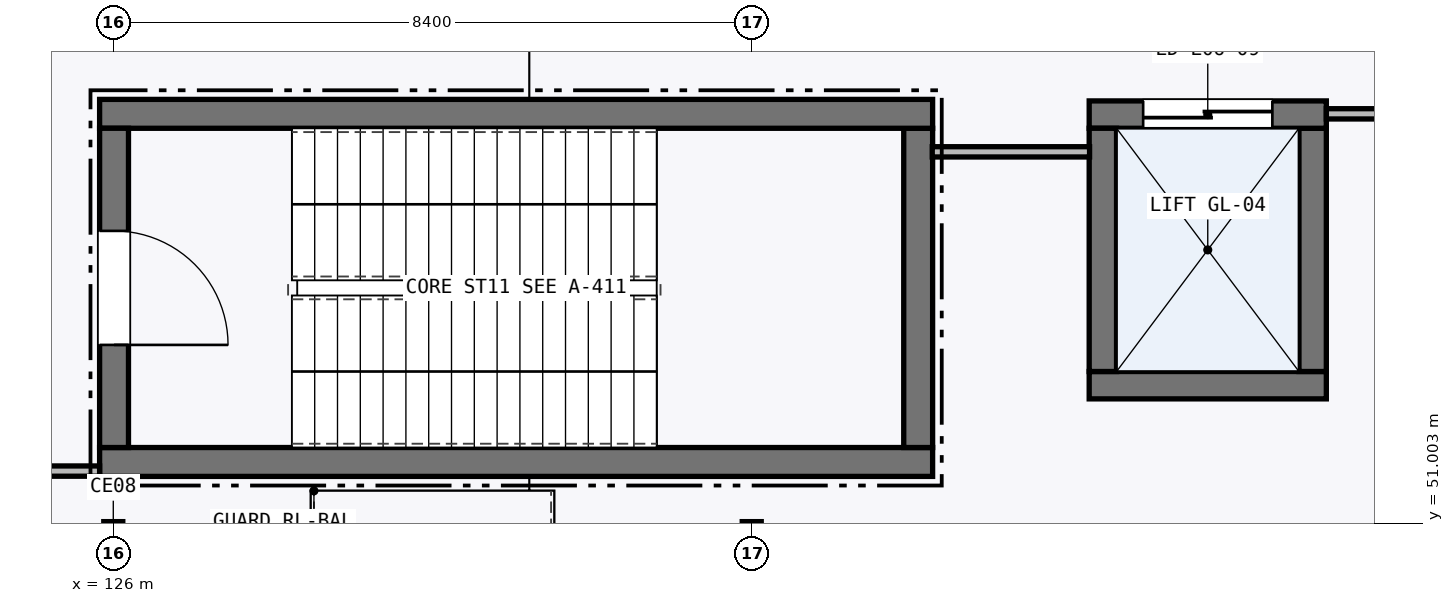
"""IFC4 building model, lengths in metres.
Left out: names, types, materials, properties, quantities, classifications, styles, units other than length and angle.
Written with IfcOpenShell. Run it as: python <this file> out.ifc"""

import sys

from ifc_helpers import new_model, si_unit, direction, frame, frame_2d, origin, origin_2d, place, context, subcontext, project, spatial, rectangle, i_section, extrude, element, fill, save


model = new_model("IFC4")
c1 = context("Model", 3, precision=1e-05, world=origin(), true_north=direction((0.0, 1.0)))
c2 = subcontext(c1, "Body", "Model", "MODEL_VIEW")
j1 = project(units=[si_unit("LENGTHUNIT", "METRE"), si_unit("PLANEANGLEUNIT", "RADIAN")], contexts=[c1])
p1 = place(None, origin())
s1 = spatial("IfcSite", under=j1, at=p1, CompositionType="ELEMENT")
p2 = place(p1, origin())
s2 = spatial("IfcBuilding", under=s1, at=p2, CompositionType="ELEMENT")
p3 = place(p2, frame((0.0, 0.0, 26.7)))
s3 = spatial("IfcBuildingStorey", under=s2, at=p3, CompositionType="ELEMENT", Elevation=26.7)
for number, where, z_axis, x_axis in (
    (1, (126.0, 50.9, 0.0), (0.0, 0.0, 1.0), (1.0, 0.0, 0.0)),
    (2, (134.4, 50.9, 0.0), (0.0, 0.0, 1.0), (1.0, 0.0, 0.0)),
):
    element("IfcColumn", number, at=place(p3, frame(where, z_axis=z_axis, x_axis=x_axis)), inside=s3, PredefinedType="COLUMN", context=c2, shape_type="SweptSolid", body=[
        extrude(i_section(OverallWidth=0.25, OverallDepth=0.25, WebThickness=0.009, FlangeThickness=0.014, FilletRadius=0.016, at=origin_2d()), origin(), (0.0, 0.0, 1.0), 5.1),
    ])
p4 = place(p3, frame((125.82, 51.81, 0.0), z_axis=(0.0, 0.0, 1.0), x_axis=(1.0, 0.0, 0.0)))
e3 = element("IfcWall", 3, at=p4, inside=s3, PredefinedType="SHEAR", context=c2, shape_type="SweptSolid", body=[
    extrude(rectangle(XDim=10.96, YDim=0.38, at=frame_2d((5.48, 0.0))), origin(), (0.0, 0.0, 1.0), 4.845),
])
p5 = place(p3, frame((136.59, 52.0, 0.0), z_axis=(0.0, 0.0, 1.0), x_axis=(0.0, 1.0, 0.0)))
e4 = element("IfcWall", 4, at=p5, inside=s3, PredefinedType="SHEAR", context=c2, shape_type="SweptSolid", body=[
    extrude(rectangle(XDim=4.2, YDim=0.38, at=frame_2d((2.1, 0.0))), origin(), (0.0, 0.0, 1.0), 4.845),
])
p6 = place(p3, frame((136.78, 56.39, 0.0), z_axis=(0.0, 0.0, 1.0), x_axis=(-1.0, 0.0, 0.0)))
e5 = element("IfcWall", 5, at=p6, inside=s3, PredefinedType="SHEAR", context=c2, shape_type="SweptSolid", body=[
    extrude(rectangle(XDim=10.96, YDim=0.38, at=frame_2d((5.48, 0.0))), origin(), (0.0, 0.0, 1.0), 4.845),
])
p7 = place(p3, frame((126.01, 56.2, 0.0), z_axis=(0.0, 0.0, 1.0), x_axis=(0.0, -1.0, 0.0)))
e6 = element("IfcWall", 6, at=p7, inside=s3, PredefinedType="SHEAR", context=c2, shape_type="SweptSolid", body=[
    extrude(rectangle(XDim=4.2, YDim=0.38, at=frame_2d((2.1, 0.0))), origin(), (0.0, 0.0, 1.0), 4.845),
])
p8 = place(p7, frame((1.35, 0.0, 0.0)))
e7 = element("IfcOpeningElement", 7, at=p8, cuts=e6, PredefinedType="OPENING", context=c2, shape_type="SweptSolid", body=[
    extrude(rectangle(XDim=1.5, YDim=2.15, at=frame_2d((0.75, 1.075))), frame((0.0, 0.2, 0.0), z_axis=(0.0, -1.0, 0.0), x_axis=(1.0, 0.0, 0.0)), (0.0, 0.0, 1.0), 0.4),
])
p9 = place(p3, frame((138.84, 52.82, 0.0), z_axis=(0.0, 0.0, 1.0), x_axis=(1.0, 0.0, 0.0)))
e8 = element("IfcWall", 8, at=p9, inside=s3, PredefinedType="SHEAR", context=c2, shape_type="SweptSolid", body=[
    extrude(rectangle(XDim=3.12, YDim=0.36, at=frame_2d((1.56, 0.0))), origin(), (0.0, 0.0, 1.0), 4.095),
])
p10 = place(p3, frame((141.78, 53.0, 0.0), z_axis=(0.0, 0.0, 1.0), x_axis=(0.0, 1.0, 0.0)))
e9 = element("IfcWall", 9, at=p10, inside=s3, PredefinedType="SHEAR", context=c2, shape_type="SweptSolid", body=[
    extrude(rectangle(XDim=3.2, YDim=0.36, at=frame_2d((1.6, 0.0))), origin(), (0.0, 0.0, 1.0), 4.095),
])
p11 = place(p3, frame((141.96, 56.38, 0.0), z_axis=(0.0, 0.0, 1.0), x_axis=(-1.0, 0.0, 0.0)))
e10 = element("IfcWall", 10, at=p11, inside=s3, PredefinedType="SHEAR", context=c2, shape_type="SweptSolid", body=[
    extrude(rectangle(XDim=3.12, YDim=0.36, at=frame_2d((1.56, 0.0))), origin(), (0.0, 0.0, 1.0), 4.095),
])
p12 = place(p11, frame((0.71, 0.0, 0.0)))
e11 = element("IfcOpeningElement", 11, at=p12, cuts=e10, PredefinedType="OPENING", context=c2, shape_type="SweptSolid", body=[
    extrude(rectangle(XDim=1.7, YDim=2.3, at=frame_2d((0.85, 1.15))), frame((0.0, 0.19, 0.0), z_axis=(0.0, -1.0, 0.0), x_axis=(1.0, 0.0, 0.0)), (0.0, 0.0, 1.0), 0.38),
])
p13 = place(p3, frame((139.02, 56.2, 0.0), z_axis=(0.0, 0.0, 1.0), x_axis=(0.0, -1.0, 0.0)))
e12 = element("IfcWall", 12, at=p13, inside=s3, PredefinedType="SHEAR", context=c2, shape_type="SweptSolid", body=[
    extrude(rectangle(XDim=3.2, YDim=0.36, at=frame_2d((1.6, 0.0))), origin(), (0.0, 0.0, 1.0), 4.095),
])
p14 = place(p3, frame((143.0, 56.39, 0.0), z_axis=(0.0, 0.0, 1.0), x_axis=(-1.0, 0.0, 0.0)))
e13 = element("IfcWall", 13, at=p14, inside=s3, PredefinedType="PARTITIONING", context=c2, shape_type="SweptSolid", body=[
    extrude(rectangle(XDim=1.04, YDim=0.135, at=frame_2d((0.52, 0.0))), origin(), (0.0, 0.0, 1.0), 4.845),
])
p15 = place(p3, frame((138.845, 55.89, 0.0), z_axis=(0.0, 0.0, 1.0), x_axis=(-1.0, 0.0, 0.0)))
e14 = element("IfcWall", 14, at=p15, inside=s3, PredefinedType="PARTITIONING", context=c2, shape_type="SweptSolid", body=[
    extrude(rectangle(XDim=2.07, YDim=0.135, at=frame_2d((1.035, 0.0))), origin(), (0.0, 0.0, 1.0), 4.845),
])
p16 = place(p3, frame((125.82, 51.69, 0.0), z_axis=(0.0, 0.0, 1.0), x_axis=(-1.0, 0.0, 0.0)))
e15 = element("IfcWall", 15, at=p16, inside=s3, PredefinedType="PARTITIONING", context=c2, shape_type="SweptSolid", body=[
    extrude(rectangle(XDim=2.82, YDim=0.135, at=frame_2d((1.41, 0.0))), origin(), (0.0, 0.0, 1.0), 4.845),
])
p17 = place(p8, origin())
e16 = element("IfcDoor", 16, at=p17, inside=s3, OperationType="SINGLE_SWING_RIGHT", PredefinedType="DOOR", context=c2, shape_type="SweptSolid", body=[
    extrude(rectangle(XDim=1.5, YDim=2.15, at=frame_2d((0.75, 1.075))), frame((0.0, 0.025, 0.0), z_axis=(0.0, -1.0, 0.0), x_axis=(1.0, 0.0, 0.0)), (0.0, 0.0, 1.0), 0.05),
])
fill(e7, e16)
p18 = place(p12, frame((1.7, 0.0, 0.0), z_axis=(0.0, 0.0, 1.0), x_axis=(-1.0, 0.0, 0.0)))
e17 = element("IfcDoor", 17, at=p18, inside=s3, OperationType="DOUBLE_DOOR_SLIDING", PredefinedType="DOOR", context=c2, shape_type="SweptSolid", body=[
    extrude(rectangle(XDim=1.7, YDim=2.3, at=frame_2d((0.85, 1.15))), frame((0.0, 0.025, 0.0), z_axis=(0.0, -1.0, 0.0), x_axis=(1.0, 0.0, 0.0)), (0.0, 0.0, 1.0), 0.05),
])
fill(e11, e17)
save(model, sys.argv[1])
